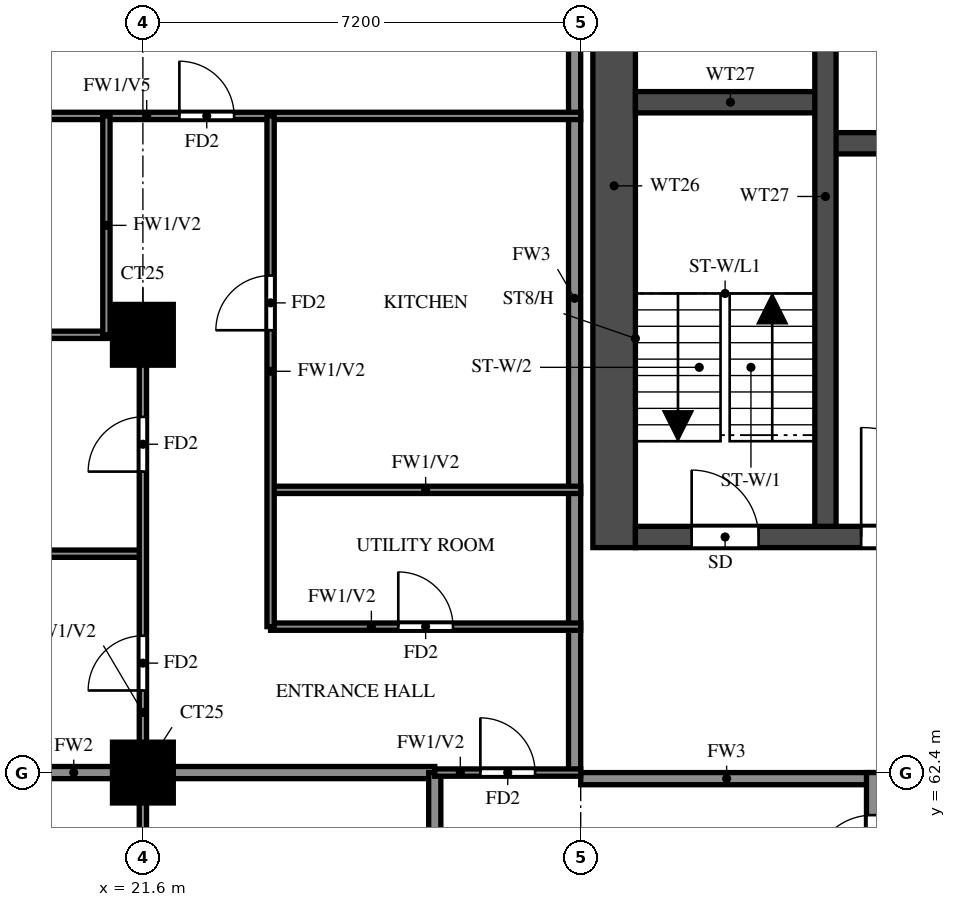
"""IFC4 building model, lengths in metres.
Left out: names, types, materials, properties, quantities, classifications, styles, units other than length and angle.
Written with IfcOpenShell. Run it as: python <this file> out.ifc"""

import sys

from ifc_helpers import new_model, si_unit, direction, frame, frame_2d, origin, origin_2d, place, context, subcontext, project, spatial, rectangle, extrude, source, transform, mapped, element, fill, save


model = new_model("IFC4")
c1 = context("Model", 3, precision=1e-05, world=origin(), true_north=direction((0.0, 1.0)))
c2 = subcontext(c1, "Body", "Model", "MODEL_VIEW")
j1 = project(units=[si_unit("LENGTHUNIT", "METRE"), si_unit("PLANEANGLEUNIT", "RADIAN")], contexts=[c1])
p1 = place(None, origin())
s1 = spatial("IfcSite", under=j1, at=p1, CompositionType="ELEMENT")
p2 = place(p1, origin())
s2 = spatial("IfcBuilding", under=s1, at=p2, CompositionType="ELEMENT")
p3 = place(p2, frame((0.0, 0.0, 150.0)))
s3 = spatial("IfcBuildingStorey", under=s2, at=p3, CompositionType="ELEMENT", Elevation=150.0)
m1 = source(origin(), c2, "Body", "SweptSolid", [
    extrude(rectangle(XDim=1.0, YDim=1.0, at=origin_2d()), origin(), (0.0, 0.0, 1.0), 3.2),
])
for number, where, z_axis, x_axis in (
    (1, (21.6, 62.4, 0.0), (0.0, 0.0, 1.0), (1.0, 0.0, 0.0)),
    (2, (21.6, 69.6, 0.0), (0.0, 0.0, 1.0), (1.0, 0.0, 0.0)),
):
    element("IfcColumn", number, at=place(p3, frame(where, z_axis=z_axis, x_axis=x_axis)), inside=s3, PredefinedType="COLUMN", context=c2, shape_type="MappedRepresentation", body=[
        mapped(m1, transform((0.0, 0.0, 0.0))),
    ])
p4 = place(p3, frame((29.35, 66.1, 0.0), z_axis=(0.0, 0.0, 1.0), x_axis=(0.0, 1.0, 0.0)))
e3 = element("IfcWall", 3, at=p4, inside=s3, PredefinedType="SHEAR", context=c2, shape_type="SweptSolid", body=[
    extrude(rectangle(XDim=11.9, YDim=0.7, at=frame_2d((5.95, 0.0))), origin(), (0.0, 0.0, 1.0), 3.2),
])
p5 = place(p3, frame((29.7, 66.275, 0.0), z_axis=(0.0, 0.0, 1.0), x_axis=(1.0, 0.0, 0.0)))
e4 = element("IfcWall", 4, at=p5, inside=s3, PredefinedType="SHEAR", context=c2, shape_type="SweptSolid", body=[
    extrude(rectangle(XDim=41.4, YDim=0.35, at=frame_2d((20.7, 0.0))), origin(), (0.0, 0.0, 1.0), 3.2),
])
p6 = place(p5, frame((0.925, 0.0, 0.0)))
e5 = element("IfcOpeningElement", 5, at=p6, cuts=e4, PredefinedType="OPENING", context=c2, shape_type="SweptSolid", body=[
    extrude(rectangle(XDim=1.1, YDim=2.1, at=frame_2d((0.55, 1.05))), frame((0.0, 0.185, 0.0), z_axis=(0.0, -1.0, 0.0), x_axis=(1.0, 0.0, 0.0)), (0.0, 0.0, 1.0), 0.37),
])
p7 = place(p5, frame((3.712, 0.0, 0.0)))
e6 = element("IfcOpeningElement", 6, at=p7, cuts=e4, PredefinedType="OPENING", context=c2, shape_type="SweptSolid", body=[
    extrude(rectangle(XDim=1.8, YDim=2.1, at=frame_2d((0.9, 1.05))), frame((0.0, 0.185, 0.0), z_axis=(0.0, -1.0, 0.0), x_axis=(1.0, 0.0, 0.0)), (0.0, 0.0, 1.0), 0.37),
])
p8 = place(p3, frame((32.825, 72.75, 0.0), z_axis=(0.0, 0.0, 1.0), x_axis=(1.0, 0.0, 0.0)))
e7 = element("IfcWall", 7, at=p8, inside=s3, PredefinedType="SHEAR", context=c2, shape_type="SweptSolid", body=[
    extrude(rectangle(XDim=35.15, YDim=0.35, at=frame_2d((17.575, 0.0))), origin(), (0.0, 0.0, 1.0), 3.2),
])
p9 = place(p8, frame((19.8, 0.0, 0.0)))
e8 = element("IfcOpeningElement", 8, at=p9, cuts=e7, PredefinedType="OPENING", context=c2, shape_type="SweptSolid", body=[
    extrude(rectangle(XDim=1.1, YDim=2.1, at=frame_2d((0.55, 1.05))), frame((0.0, 0.185, 0.0), z_axis=(0.0, -1.0, 0.0), x_axis=(1.0, 0.0, 0.0)), (0.0, 0.0, 1.0), 0.37),
])
p10 = place(p8, frame((27.7, 0.0, 0.0)))
e9 = element("IfcOpeningElement", 9, at=p10, cuts=e7, PredefinedType="OPENING", context=c2, shape_type="SweptSolid", body=[
    extrude(rectangle(XDim=1.1, YDim=2.1, at=frame_2d((0.55, 1.05))), frame((0.0, 0.185, 0.0), z_axis=(0.0, -1.0, 0.0), x_axis=(1.0, 0.0, 0.0)), (0.0, 0.0, 1.0), 0.37),
])
p11 = place(p8, frame((30.3, 0.0, 0.0)))
e10 = element("IfcOpeningElement", 10, at=p11, cuts=e7, PredefinedType="OPENING", context=c2, shape_type="SweptSolid", body=[
    extrude(rectangle(XDim=1.1, YDim=2.1, at=frame_2d((0.55, 1.05))), frame((0.0, 0.185, 0.0), z_axis=(0.0, -1.0, 0.0), x_axis=(1.0, 0.0, 0.0)), (0.0, 0.0, 1.0), 0.37),
])
p12 = place(p8, frame((3.8, 0.0, 0.0)))
e11 = element("IfcOpeningElement", 11, at=p12, cuts=e7, PredefinedType="OPENING", context=c2, shape_type="SweptSolid", body=[
    extrude(rectangle(XDim=1.1, YDim=2.1, at=frame_2d((0.55, 1.05))), frame((0.0, 0.185, 0.0), z_axis=(0.0, -1.0, 0.0), x_axis=(1.0, 0.0, 0.0)), (0.0, 0.0, 1.0), 0.37),
])
p13 = place(p8, frame((6.55, 0.0, 0.0)))
e12 = element("IfcOpeningElement", 12, at=p13, cuts=e7, PredefinedType="OPENING", context=c2, shape_type="SweptSolid", body=[
    extrude(rectangle(XDim=1.1, YDim=2.1, at=frame_2d((0.55, 1.05))), frame((0.0, 0.185, 0.0), z_axis=(0.0, -1.0, 0.0), x_axis=(1.0, 0.0, 0.0)), (0.0, 0.0, 1.0), 0.37),
])
p14 = place(p8, frame((9.3, 0.0, 0.0)))
e13 = element("IfcOpeningElement", 13, at=p14, cuts=e7, PredefinedType="OPENING", context=c2, shape_type="SweptSolid", body=[
    extrude(rectangle(XDim=1.1, YDim=2.1, at=frame_2d((0.55, 1.05))), frame((0.0, 0.185, 0.0), z_axis=(0.0, -1.0, 0.0), x_axis=(1.0, 0.0, 0.0)), (0.0, 0.0, 1.0), 0.37),
])
p15 = place(p8, frame((12.05, 0.0, 0.0)))
e14 = element("IfcOpeningElement", 14, at=p15, cuts=e7, PredefinedType="OPENING", context=c2, shape_type="SweptSolid", body=[
    extrude(rectangle(XDim=1.1, YDim=2.1, at=frame_2d((0.55, 1.05))), frame((0.0, 0.185, 0.0), z_axis=(0.0, -1.0, 0.0), x_axis=(1.0, 0.0, 0.0)), (0.0, 0.0, 1.0), 0.37),
])
p16 = place(p8, frame((14.8, 0.0, 0.0)))
e15 = element("IfcOpeningElement", 15, at=p16, cuts=e7, PredefinedType="OPENING", context=c2, shape_type="SweptSolid", body=[
    extrude(rectangle(XDim=1.1, YDim=2.1, at=frame_2d((0.55, 1.05))), frame((0.0, 0.185, 0.0), z_axis=(0.0, -1.0, 0.0), x_axis=(1.0, 0.0, 0.0)), (0.0, 0.0, 1.0), 0.37),
])
p17 = place(p8, frame((17.55, 0.0, 0.0)))
e16 = element("IfcOpeningElement", 16, at=p17, cuts=e7, PredefinedType="OPENING", context=c2, shape_type="SweptSolid", body=[
    extrude(rectangle(XDim=1.1, YDim=2.1, at=frame_2d((0.55, 1.05))), frame((0.0, 0.185, 0.0), z_axis=(0.0, -1.0, 0.0), x_axis=(1.0, 0.0, 0.0)), (0.0, 0.0, 1.0), 0.37),
])
p18 = place(p8, frame((0.938, 0.0, 0.0)))
e17 = element("IfcOpeningElement", 17, at=p18, cuts=e7, PredefinedType="OPENING", context=c2, shape_type="SweptSolid", body=[
    extrude(rectangle(XDim=1.1, YDim=2.1, at=frame_2d((0.55, 1.05))), frame((0.0, 0.185, 0.0), z_axis=(0.0, -1.0, 0.0), x_axis=(1.0, 0.0, 0.0)), (0.0, 0.0, 1.0), 0.37),
])
p19 = place(p3, frame((29.7, 73.425, 0.0), z_axis=(0.0, 0.0, 1.0), x_axis=(1.0, 0.0, 0.0)))
e18 = element("IfcWall", 18, at=p19, inside=s3, PredefinedType="SHEAR", context=c2, shape_type="SweptSolid", body=[
    extrude(rectangle(XDim=3.125, YDim=0.35, at=frame_2d((1.562, 0.0))), origin(), (0.0, 0.0, 1.0), 3.2),
])
p20 = place(p3, frame((32.825, 66.45, 0.0), z_axis=(0.0, 0.0, 1.0), x_axis=(0.0, 1.0, 0.0)))
e19 = element("IfcWall", 19, at=p20, inside=s3, PredefinedType="SHEAR", context=c2, shape_type="SweptSolid", body=[
    extrude(rectangle(XDim=10.85, YDim=0.35, at=frame_2d((5.425, 0.0))), origin(), (0.0, 0.0, 1.0), 3.2),
])
p21 = place(p3, frame((28.8, 62.3, 0.0), z_axis=(0.0, 0.0, 1.0), x_axis=(1.0, 0.0, 0.0)))
e20 = element("IfcWall", 20, at=p21, inside=s3, PredefinedType="SOLIDWALL", context=c2, shape_type="SweptSolid", body=[
    extrude(rectangle(XDim=4.8, YDim=0.2, at=frame_2d((2.4, 0.0))), origin(), (0.0, 0.0, 1.0), 3.2),
])
p22 = place(p3, frame((28.7, 62.4, 0.0), z_axis=(0.0, 0.0, 1.0), x_axis=(0.0, 1.0, 0.0)))
e21 = element("IfcWall", 21, at=p22, inside=s3, PredefinedType="SOLIDWALL", context=c2, shape_type="SweptSolid", body=[
    extrude(rectangle(XDim=15.6, YDim=0.2, at=frame_2d((7.8, 0.0))), origin(), (0.0, 0.0, 1.0), 3.2),
])
p23 = place(p3, frame((33.6, 45.6, 0.0), z_axis=(0.0, 0.0, 1.0), x_axis=(0.0, 1.0, 0.0)))
e22 = element("IfcWall", 22, at=p23, inside=s3, PredefinedType="SOLIDWALL", context=c2, shape_type="SweptSolid", body=[
    extrude(rectangle(XDim=16.8, YDim=0.2, at=frame_2d((8.4, 0.0))), origin(), (0.0, 0.0, 1.0), 3.2),
])
p24 = place(p23, frame((0.7, 0.0, 0.0)))
e23 = element("IfcOpeningElement", 23, at=p24, cuts=e22, PredefinedType="OPENING", context=c2, shape_type="SweptSolid", body=[
    extrude(rectangle(XDim=1.0, YDim=2.1, at=frame_2d((0.5, 1.05))), frame((0.0, 0.11, 0.0), z_axis=(0.0, -1.0, 0.0), x_axis=(1.0, 0.0, 0.0)), (0.0, 0.0, 1.0), 0.22),
])
p25 = place(p23, frame((6.7, 0.0, 0.0)))
e24 = element("IfcOpeningElement", 24, at=p25, cuts=e22, PredefinedType="OPENING", context=c2, shape_type="SweptSolid", body=[
    extrude(rectangle(XDim=1.0, YDim=2.1, at=frame_2d((0.5, 1.05))), frame((0.0, 0.11, 0.0), z_axis=(0.0, -1.0, 0.0), x_axis=(1.0, 0.0, 0.0)), (0.0, 0.0, 1.0), 0.22),
])
p26 = place(p23, frame((15.1, 0.0, 0.0)))
e25 = element("IfcOpeningElement", 25, at=p26, cuts=e22, PredefinedType="OPENING", context=c2, shape_type="SweptSolid", body=[
    extrude(rectangle(XDim=1.0, YDim=2.1, at=frame_2d((0.5, 1.05))), frame((0.0, 0.11, 0.0), z_axis=(0.0, -1.0, 0.0), x_axis=(1.0, 0.0, 0.0)), (0.0, 0.0, 1.0), 0.22),
])
p27 = place(p3, frame((14.525, 62.4, 0.0), z_axis=(0.0, 0.0, 1.0), x_axis=(1.0, 0.0, 0.0)))
e26 = element("IfcWall", 26, at=p27, inside=s3, PredefinedType="SOLIDWALL", context=c2, shape_type="SweptSolid", body=[
    extrude(rectangle(XDim=11.875, YDim=0.2, at=frame_2d((5.938, 0.0))), origin(), (0.0, 0.0, 1.0), 3.2),
])
p28 = place(p3, frame((26.4, 60.0, 0.0), z_axis=(0.0, 0.0, 1.0), x_axis=(0.0, 1.0, 0.0)))
e27 = element("IfcWall", 27, at=p28, inside=s3, PredefinedType="SOLIDWALL", context=c2, shape_type="SweptSolid", body=[
    extrude(rectangle(XDim=2.4, YDim=0.2, at=frame_2d((1.2, 0.0))), origin(), (0.0, 0.0, 1.0), 3.2),
])
p29 = place(p3, frame((26.4, 62.4, 0.0), z_axis=(0.0, 0.0, 1.0), x_axis=(1.0, 0.0, 0.0)))
e28 = element("IfcWall", 28, at=p29, inside=s3, PredefinedType="PARTITIONING", context=c2, shape_type="SweptSolid", body=[
    extrude(rectangle(XDim=2.4, YDim=0.12, at=frame_2d((1.2, 0.0))), origin(), (0.0, 0.0, 1.0), 3.2),
])
p30 = place(p29, frame((0.75, 0.0, 0.0)))
e29 = element("IfcOpeningElement", 29, at=p30, cuts=e28, PredefinedType="OPENING", context=c2, shape_type="SweptSolid", body=[
    extrude(rectangle(XDim=0.9, YDim=2.1, at=frame_2d((0.45, 1.05))), frame((0.0, 0.07, 0.0), z_axis=(0.0, -1.0, 0.0), x_axis=(1.0, 0.0, 0.0)), (0.0, 0.0, 1.0), 0.14),
])
p31 = place(p3, frame((23.7, 64.8, 0.0), z_axis=(0.0, 0.0, 1.0), x_axis=(1.0, 0.0, 0.0)))
e30 = element("IfcWall", 30, at=p31, inside=s3, PredefinedType="PARTITIONING", context=c2, shape_type="SweptSolid", body=[
    extrude(rectangle(XDim=5.1, YDim=0.12, at=frame_2d((2.55, 0.0))), origin(), (0.0, 0.0, 1.0), 3.2),
])
p32 = place(p31, frame((2.1, 0.0, 0.0)))
e31 = element("IfcOpeningElement", 31, at=p32, cuts=e30, PredefinedType="OPENING", context=c2, shape_type="SweptSolid", body=[
    extrude(rectangle(XDim=0.9, YDim=2.1, at=frame_2d((0.45, 1.05))), frame((0.0, 0.07, 0.0), z_axis=(0.0, -1.0, 0.0), x_axis=(1.0, 0.0, 0.0)), (0.0, 0.0, 1.0), 0.14),
])
p33 = place(p3, frame((14.525, 66.0, 0.0), z_axis=(0.0, 0.0, 1.0), x_axis=(1.0, 0.0, 0.0)))
e32 = element("IfcWall", 32, at=p33, inside=s3, PredefinedType="PARTITIONING", context=c2, shape_type="SweptSolid", body=[
    extrude(rectangle(XDim=7.075, YDim=0.12, at=frame_2d((3.538, 0.0))), origin(), (0.0, 0.0, 1.0), 2.3),
])
p34 = place(p3, frame((23.7, 67.05, 0.0), z_axis=(0.0, 0.0, 1.0), x_axis=(1.0, 0.0, 0.0)))
e33 = element("IfcWall", 33, at=p34, inside=s3, PredefinedType="PARTITIONING", context=c2, shape_type="SweptSolid", body=[
    extrude(rectangle(XDim=5.1, YDim=0.12, at=frame_2d((2.55, 0.0))), origin(), (0.0, 0.0, 1.0), 3.2),
])
p35 = place(p3, frame((14.525, 69.6, 0.0), z_axis=(0.0, 0.0, 1.0), x_axis=(1.0, 0.0, 0.0)))
e34 = element("IfcWall", 34, at=p35, inside=s3, PredefinedType="PARTITIONING", context=c2, shape_type="SweptSolid", body=[
    extrude(rectangle(XDim=7.075, YDim=0.12, at=frame_2d((3.538, 0.0))), origin(), (0.0, 0.0, 1.0), 3.2),
])
p36 = place(p35, frame((2.837, 0.0, 0.0)))
e35 = element("IfcOpeningElement", 35, at=p36, cuts=e34, PredefinedType="OPENING", context=c2, shape_type="SweptSolid", body=[
    extrude(rectangle(XDim=0.8, YDim=2.1, at=frame_2d((0.4, 1.05))), frame((0.0, 0.07, 0.0), z_axis=(0.0, -1.0, 0.0), x_axis=(1.0, 0.0, 0.0)), (0.0, 0.0, 1.0), 0.14),
])
p37 = place(p3, frame((14.525, 73.2, 0.0), z_axis=(0.0, 0.0, 1.0), x_axis=(1.0, 0.0, 0.0)))
e36 = element("IfcWall", 36, at=p37, inside=s3, PredefinedType="PARTITIONING", context=c2, shape_type="SweptSolid", body=[
    extrude(rectangle(XDim=14.275, YDim=0.12, at=frame_2d((7.138, 0.0))), origin(), (0.0, 0.0, 1.0), 2.3),
])
p38 = place(p37, frame((7.675, 0.0, 0.0)))
e37 = element("IfcOpeningElement", 37, at=p38, cuts=e36, PredefinedType="OPENING", context=c2, shape_type="SweptSolid", body=[
    extrude(rectangle(XDim=0.9, YDim=2.1, at=frame_2d((0.45, 1.05))), frame((0.0, 0.07, 0.0), z_axis=(0.0, -1.0, 0.0), x_axis=(1.0, 0.0, 0.0)), (0.0, 0.0, 1.0), 0.14),
])
p39 = place(p3, frame((21.0, 69.6, 0.0), z_axis=(0.0, 0.0, 1.0), x_axis=(0.0, 1.0, 0.0)))
e38 = element("IfcWall", 38, at=p39, inside=s3, PredefinedType="PARTITIONING", context=c2, shape_type="SweptSolid", body=[
    extrude(rectangle(XDim=3.6, YDim=0.12, at=frame_2d((1.8, 0.0))), origin(), (0.0, 0.0, 1.0), 3.2),
])
p40 = place(p3, frame((21.6, 58.8, 0.0), z_axis=(0.0, 0.0, 1.0), x_axis=(0.0, 1.0, 0.0)))
e39 = element("IfcWall", 39, at=p40, inside=s3, PredefinedType="PARTITIONING", context=c2, shape_type="SweptSolid", body=[
    extrude(rectangle(XDim=10.8, YDim=0.12, at=frame_2d((5.4, 0.0))), origin(), (0.0, 0.0, 1.0), 3.2),
])
p41 = place(p40, frame((1.35, 0.0, 0.0)))
e40 = element("IfcOpeningElement", 40, at=p41, cuts=e39, PredefinedType="OPENING", context=c2, shape_type="SweptSolid", body=[
    extrude(rectangle(XDim=0.9, YDim=2.1, at=frame_2d((0.45, 1.05))), frame((0.0, 0.07, 0.0), z_axis=(0.0, -1.0, 0.0), x_axis=(1.0, 0.0, 0.0)), (0.0, 0.0, 1.0), 0.14),
])
p42 = place(p40, frame((4.95, 0.0, 0.0)))
e41 = element("IfcOpeningElement", 41, at=p42, cuts=e39, PredefinedType="OPENING", context=c2, shape_type="SweptSolid", body=[
    extrude(rectangle(XDim=0.9, YDim=2.1, at=frame_2d((0.45, 1.05))), frame((0.0, 0.07, 0.0), z_axis=(0.0, -1.0, 0.0), x_axis=(1.0, 0.0, 0.0)), (0.0, 0.0, 1.0), 0.14),
])
p43 = place(p40, frame((8.55, 0.0, 0.0)))
e42 = element("IfcOpeningElement", 42, at=p43, cuts=e39, PredefinedType="OPENING", context=c2, shape_type="SweptSolid", body=[
    extrude(rectangle(XDim=0.9, YDim=2.1, at=frame_2d((0.45, 1.05))), frame((0.0, 0.07, 0.0), z_axis=(0.0, -1.0, 0.0), x_axis=(1.0, 0.0, 0.0)), (0.0, 0.0, 1.0), 0.14),
])
p44 = place(p3, frame((23.7, 64.8, 0.0), z_axis=(0.0, 0.0, 1.0), x_axis=(0.0, 1.0, 0.0)))
e43 = element("IfcWall", 43, at=p44, inside=s3, PredefinedType="PARTITIONING", context=c2, shape_type="SweptSolid", body=[
    extrude(rectangle(XDim=8.4, YDim=0.12, at=frame_2d((4.2, 0.0))), origin(), (0.0, 0.0, 1.0), 3.2),
])
p45 = place(p44, frame((4.875, 0.0, 0.0)))
e44 = element("IfcOpeningElement", 44, at=p45, cuts=e43, PredefinedType="OPENING", context=c2, shape_type="SweptSolid", body=[
    extrude(rectangle(XDim=0.9, YDim=2.1, at=frame_2d((0.45, 1.05))), frame((0.0, 0.07, 0.0), z_axis=(0.0, -1.0, 0.0), x_axis=(1.0, 0.0, 0.0)), (0.0, 0.0, 1.0), 0.14),
])
p46 = place(p6, origin())
e45 = element("IfcDoor", 45, at=p46, inside=s3, OperationType="SINGLE_SWING_LEFT", PredefinedType="DOOR", context=c2, shape_type="SweptSolid", body=[
    extrude(rectangle(XDim=1.1, YDim=2.1, at=frame_2d((0.55, 1.05))), frame((0.0, 0.025, 0.0), z_axis=(0.0, -1.0, 0.0), x_axis=(1.0, 0.0, 0.0)), (0.0, 0.0, 1.0), 0.05),
])
fill(e5, e45)
p47 = place(p7, origin())
e46 = element("IfcDoor", 46, at=p47, inside=s3, OperationType="DOUBLE_DOOR_SINGLE_SWING", PredefinedType="DOOR", context=c2, shape_type="SweptSolid", body=[
    extrude(rectangle(XDim=1.8, YDim=2.1, at=frame_2d((0.9, 1.05))), frame((0.0, 0.025, 0.0), z_axis=(0.0, -1.0, 0.0), x_axis=(1.0, 0.0, 0.0)), (0.0, 0.0, 1.0), 0.05),
])
fill(e6, e46)
p48 = place(p30, origin())
e47 = element("IfcDoor", 47, at=p48, inside=s3, OperationType="SINGLE_SWING_RIGHT", PredefinedType="DOOR", context=c2, shape_type="SweptSolid", body=[
    extrude(rectangle(XDim=0.9, YDim=2.1, at=frame_2d((0.45, 1.05))), frame((0.0, 0.025, 0.0), z_axis=(0.0, -1.0, 0.0), x_axis=(1.0, 0.0, 0.0)), (0.0, 0.0, 1.0), 0.05),
])
fill(e29, e47)
p49 = place(p26, origin())
e48 = element("IfcDoor", 48, at=p49, inside=s3, OperationType="SINGLE_SWING_LEFT", PredefinedType="DOOR", context=c2, shape_type="SweptSolid", body=[
    extrude(rectangle(XDim=1.0, YDim=2.1, at=frame_2d((0.5, 1.05))), frame((0.0, 0.025, 0.0), z_axis=(0.0, -1.0, 0.0), x_axis=(1.0, 0.0, 0.0)), (0.0, 0.0, 1.0), 0.05),
])
fill(e25, e48)
p50 = place(p42, origin())
e49 = element("IfcDoor", 49, at=p50, inside=s3, OperationType="SINGLE_SWING_LEFT", PredefinedType="DOOR", context=c2, shape_type="SweptSolid", body=[
    extrude(rectangle(XDim=0.9, YDim=2.1, at=frame_2d((0.45, 1.05))), frame((0.0, 0.025, 0.0), z_axis=(0.0, -1.0, 0.0), x_axis=(1.0, 0.0, 0.0)), (0.0, 0.0, 1.0), 0.05),
])
fill(e41, e49)
p51 = place(p43, origin())
e50 = element("IfcDoor", 50, at=p51, inside=s3, OperationType="SINGLE_SWING_RIGHT", PredefinedType="DOOR", context=c2, shape_type="SweptSolid", body=[
    extrude(rectangle(XDim=0.9, YDim=2.1, at=frame_2d((0.45, 1.05))), frame((0.0, 0.025, 0.0), z_axis=(0.0, -1.0, 0.0), x_axis=(1.0, 0.0, 0.0)), (0.0, 0.0, 1.0), 0.05),
])
fill(e42, e50)
p52 = place(p38, origin())
e51 = element("IfcDoor", 51, at=p52, inside=s3, OperationType="SINGLE_SWING_LEFT", PredefinedType="DOOR", context=c2, shape_type="SweptSolid", body=[
    extrude(rectangle(XDim=0.9, YDim=2.1, at=frame_2d((0.45, 1.05))), frame((0.0, 0.025, 0.0), z_axis=(0.0, -1.0, 0.0), x_axis=(1.0, 0.0, 0.0)), (0.0, 0.0, 1.0), 0.05),
])
fill(e37, e51)
p53 = place(p32, origin())
e52 = element("IfcDoor", 52, at=p53, inside=s3, OperationType="SINGLE_SWING_RIGHT", PredefinedType="DOOR", context=c2, shape_type="SweptSolid", body=[
    extrude(rectangle(XDim=0.9, YDim=2.1, at=frame_2d((0.45, 1.05))), frame((0.0, 0.025, 0.0), z_axis=(0.0, -1.0, 0.0), x_axis=(1.0, 0.0, 0.0)), (0.0, 0.0, 1.0), 0.05),
])
fill(e31, e52)
p54 = place(p45, origin())
e53 = element("IfcDoor", 53, at=p54, inside=s3, OperationType="SINGLE_SWING_LEFT", PredefinedType="DOOR", context=c2, shape_type="SweptSolid", body=[
    extrude(rectangle(XDim=0.9, YDim=2.1, at=frame_2d((0.45, 1.05))), frame((0.0, 0.025, 0.0), z_axis=(0.0, -1.0, 0.0), x_axis=(1.0, 0.0, 0.0)), (0.0, 0.0, 1.0), 0.05),
])
fill(e44, e53)
save(model, sys.argv[1])
